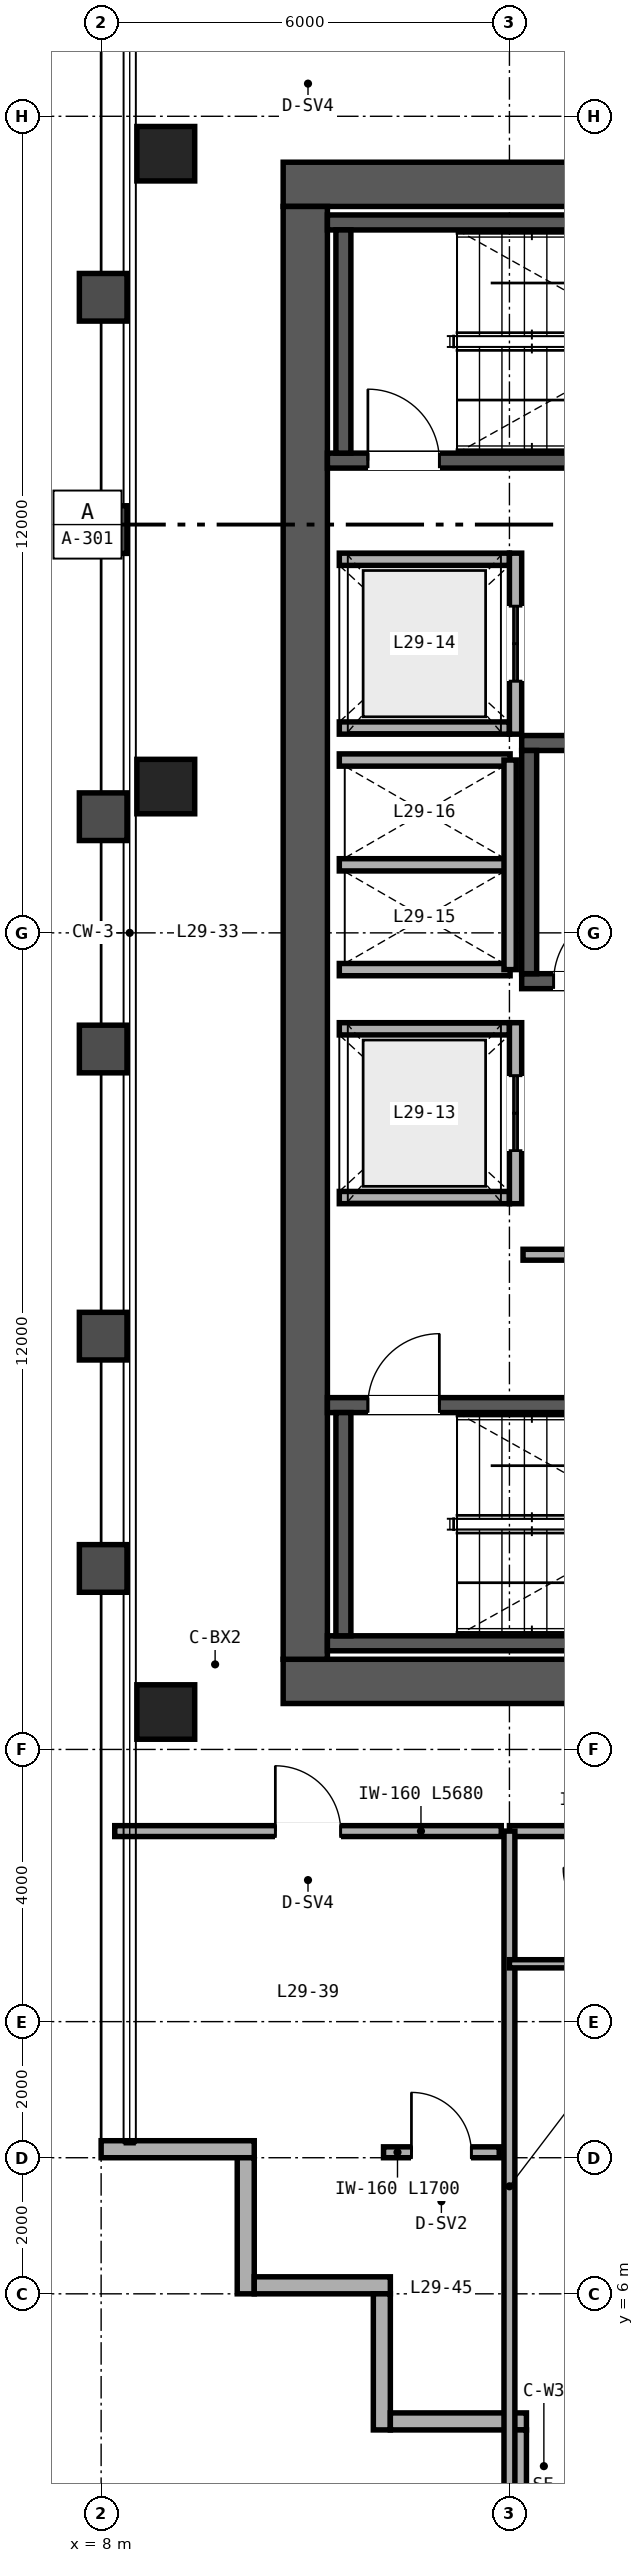
"""IFC4 building model, lengths in metres.
Left out: names, types, materials, properties, quantities, classifications, styles, units other than length and angle.
Written with IfcOpenShell. Run it as: python <this file> out.ifc"""

import sys

from ifc_helpers import new_model, si_unit, direction, frame, frame_2d, origin, origin_2d, place, context, subcontext, project, spatial, rectangle, hollow_rectangle, extrude, source, transform, mapped, element, fill, save


model = new_model("IFC4")
c1 = context("Model", 3, precision=1e-05, world=origin(), true_north=direction((0.0, 1.0)))
c2 = subcontext(c1, "Body", "Model", "MODEL_VIEW")
j1 = project(units=[si_unit("LENGTHUNIT", "METRE"), si_unit("PLANEANGLEUNIT", "RADIAN")], contexts=[c1])
p1 = place(None, origin())
s1 = spatial("IfcSite", under=j1, at=p1, CompositionType="ELEMENT")
p2 = place(p1, origin())
s2 = spatial("IfcBuilding", under=s1, at=p2, CompositionType="ELEMENT")
p3 = place(p2, frame((0.0, 0.0, 118.8)))
s3 = spatial("IfcBuildingStorey", under=s2, at=p3, CompositionType="ELEMENT", Elevation=118.8)
p4 = place(p3, frame((10.675, 15.0, 0.0), z_axis=(0.0, 0.0, 1.0), x_axis=(1.0, 0.0, 0.0)))
e1 = element("IfcWall", 1, at=p4, inside=s3, PredefinedType="SHEAR", context=c2, shape_type="SweptSolid", body=[
    extrude(rectangle(XDim=12.65, YDim=0.65, at=frame_2d((6.325, 0.0))), origin(), (0.0, 0.0, 1.0), 3.36),
])
p5 = place(p4, frame((8.905, 0.0, 0.0)))
e2 = element("IfcOpeningElement", 2, at=p5, cuts=e1, PredefinedType="OPENING", context=c2, shape_type="SweptSolid", body=[
    extrude(rectangle(XDim=1.0, YDim=2.15, at=frame_2d((0.5, 1.075))), frame((0.0, 0.335, 0.0), z_axis=(0.0, -1.0, 0.0), x_axis=(1.0, 0.0, 0.0)), (0.0, 0.0, 1.0), 0.67),
])
p6 = place(p3, frame((10.675, 37.0, 0.0), z_axis=(0.0, 0.0, 1.0), x_axis=(1.0, 0.0, 0.0)))
e3 = element("IfcWall", 3, at=p6, inside=s3, PredefinedType="SHEAR", context=c2, shape_type="SweptSolid", body=[
    extrude(rectangle(XDim=12.65, YDim=0.65, at=frame_2d((6.325, 0.0))), origin(), (0.0, 0.0, 1.0), 3.36),
])
p7 = place(p6, frame((8.905, 0.0, 0.0)))
e4 = element("IfcOpeningElement", 4, at=p7, cuts=e3, PredefinedType="OPENING", context=c2, shape_type="SweptSolid", body=[
    extrude(rectangle(XDim=1.0, YDim=2.15, at=frame_2d((0.5, 1.075))), frame((0.0, 0.335, 0.0), z_axis=(0.0, -1.0, 0.0), x_axis=(1.0, 0.0, 0.0)), (0.0, 0.0, 1.0), 0.67),
])
p8 = place(p3, frame((11.0, 15.325, 0.0), z_axis=(0.0, 0.0, 1.0), x_axis=(0.0, 1.0, 0.0)))
e5 = element("IfcWall", 5, at=p8, inside=s3, PredefinedType="SHEAR", context=c2, shape_type="SweptSolid", body=[
    extrude(rectangle(XDim=21.35, YDim=0.65, at=frame_2d((10.675, 0.0))), origin(), (0.0, 0.0, 1.0), 3.36),
])
p9 = place(p3, frame((11.325, 15.56, 0.0), z_axis=(0.0, 0.0, 1.0), x_axis=(1.0, 0.0, 0.0)))
e6 = element("IfcWall", 6, at=p9, inside=s3, PredefinedType="SHEAR", context=c2, shape_type="SweptSolid", body=[
    extrude(rectangle(XDim=7.985, YDim=0.22, at=frame_2d((3.993, 0.0))), origin(), (0.0, 0.0, 1.0), 3.4),
])
p10 = place(p3, frame((11.325, 19.06, 0.0), z_axis=(0.0, 0.0, 1.0), x_axis=(1.0, 0.0, 0.0)))
e7 = element("IfcWall", 7, at=p10, inside=s3, PredefinedType="SHEAR", context=c2, shape_type="SweptSolid", body=[
    extrude(rectangle(XDim=7.985, YDim=0.22, at=frame_2d((3.993, 0.0))), origin(), (0.0, 0.0, 1.0), 3.4),
])
p11 = place(p10, frame((0.595, 0.0, 0.0)))
e8 = element("IfcOpeningElement", 8, at=p11, cuts=e7, PredefinedType="OPENING", context=c2, shape_type="SweptSolid", body=[
    extrude(rectangle(XDim=1.05, YDim=2.15, at=frame_2d((0.525, 1.075))), frame((0.0, 0.12, 0.0), z_axis=(0.0, -1.0, 0.0), x_axis=(1.0, 0.0, 0.0)), (0.0, 0.0, 1.0), 0.24),
])
p12 = place(p3, frame((11.56, 15.67, 0.0), z_axis=(0.0, 0.0, 1.0), x_axis=(0.0, 1.0, 0.0)))
e9 = element("IfcWall", 9, at=p12, inside=s3, PredefinedType="SHEAR", context=c2, shape_type="SweptSolid", body=[
    extrude(rectangle(XDim=3.28, YDim=0.22, at=frame_2d((1.64, 0.0))), origin(), (0.0, 0.0, 1.0), 3.4),
])
p13 = place(p3, frame((11.325, 32.94, 0.0), z_axis=(0.0, 0.0, 1.0), x_axis=(1.0, 0.0, 0.0)))
e10 = element("IfcWall", 10, at=p13, inside=s3, PredefinedType="SHEAR", context=c2, shape_type="SweptSolid", body=[
    extrude(rectangle(XDim=7.985, YDim=0.22, at=frame_2d((3.993, 0.0))), origin(), (0.0, 0.0, 1.0), 3.4),
])
p14 = place(p13, frame((0.595, 0.0, 0.0)))
e11 = element("IfcOpeningElement", 11, at=p14, cuts=e10, PredefinedType="OPENING", context=c2, shape_type="SweptSolid", body=[
    extrude(rectangle(XDim=1.05, YDim=2.15, at=frame_2d((0.525, 1.075))), frame((0.0, 0.12, 0.0), z_axis=(0.0, -1.0, 0.0), x_axis=(1.0, 0.0, 0.0)), (0.0, 0.0, 1.0), 0.24),
])
p15 = place(p3, frame((11.325, 36.44, 0.0), z_axis=(0.0, 0.0, 1.0), x_axis=(1.0, 0.0, 0.0)))
e12 = element("IfcWall", 12, at=p15, inside=s3, PredefinedType="SHEAR", context=c2, shape_type="SweptSolid", body=[
    extrude(rectangle(XDim=7.985, YDim=0.22, at=frame_2d((3.993, 0.0))), origin(), (0.0, 0.0, 1.0), 3.4),
])
p16 = place(p3, frame((11.56, 33.05, 0.0), z_axis=(0.0, 0.0, 1.0), x_axis=(0.0, 1.0, 0.0)))
e13 = element("IfcWall", 13, at=p16, inside=s3, PredefinedType="SHEAR", context=c2, shape_type="SweptSolid", body=[
    extrude(rectangle(XDim=3.28, YDim=0.22, at=frame_2d((1.64, 0.0))), origin(), (0.0, 0.0, 1.0), 3.4),
])
p17 = place(p3, frame((14.18, 25.29, 0.0), z_axis=(0.0, 0.0, 1.0), x_axis=(1.0, 0.0, 0.0)))
e14 = element("IfcWall", 14, at=p17, inside=s3, PredefinedType="SHEAR", context=c2, shape_type="SweptSolid", body=[
    extrude(rectangle(XDim=8.495, YDim=0.22, at=frame_2d((4.248, 0.0))), origin(), (0.0, 0.0, 1.0), 3.4),
])
p18 = place(p17, frame((0.47, 0.0, 0.0)))
e15 = element("IfcOpeningElement", 15, at=p18, cuts=e14, PredefinedType="OPENING", context=c2, shape_type="SweptSolid", body=[
    extrude(rectangle(XDim=1.05, YDim=2.15, at=frame_2d((0.525, 1.075))), frame((0.0, 0.12, 0.0), z_axis=(0.0, -1.0, 0.0), x_axis=(1.0, 0.0, 0.0)), (0.0, 0.0, 1.0), 0.24),
])
p19 = place(p3, frame((14.18, 28.79, 0.0), z_axis=(0.0, 0.0, 1.0), x_axis=(1.0, 0.0, 0.0)))
e16 = element("IfcWall", 16, at=p19, inside=s3, PredefinedType="SHEAR", context=c2, shape_type="SweptSolid", body=[
    extrude(rectangle(XDim=8.495, YDim=0.22, at=frame_2d((4.248, 0.0))), origin(), (0.0, 0.0, 1.0), 3.4),
])
p20 = place(p3, frame((14.29, 25.4, 0.0), z_axis=(0.0, 0.0, 1.0), x_axis=(0.0, 1.0, 0.0)))
e17 = element("IfcWall", 17, at=p20, inside=s3, PredefinedType="SHEAR", context=c2, shape_type="SweptSolid", body=[
    extrude(rectangle(XDim=3.28, YDim=0.22, at=frame_2d((1.64, 0.0))), origin(), (0.0, 0.0, 1.0), 3.4),
])
m1 = source(origin(), c2, "Body", "SweptSolid", [
    extrude(hollow_rectangle(XDim=0.85, YDim=0.8, WallThickness=0.032, at=origin_2d()), origin(), (0.0, 0.0, 1.0), 3.36),
])
for number, where, z_axis, x_axis in (
    (18, (8.95, 14.55, 0.0), (0.0, 0.0, 1.0), (1.0, 0.0, 0.0)),
    (19, (8.95, 28.15, 0.0), (0.0, 0.0, 1.0), (1.0, 0.0, 0.0)),
    (20, (8.95, 37.45, 0.0), (0.0, 0.0, 1.0), (1.0, 0.0, 0.0)),
):
    element("IfcColumn", number, at=place(p3, frame(where, z_axis=z_axis, x_axis=x_axis)), inside=s3, PredefinedType="COLUMN", context=c2, shape_type="MappedRepresentation", body=[
        mapped(m1, transform((0.0, 0.0, 0.0), scale=1.0)),
    ])
p21 = place(p3, frame((8.0, 8.125, 0.0), z_axis=(0.0, 0.0, 1.0), x_axis=(1.0, 0.0, 0.0)))
e21 = element("IfcWall", 21, at=p21, inside=s3, PredefinedType="SOLIDWALL", context=c2, shape_type="SweptSolid", body=[
    extrude(rectangle(XDim=2.25, YDim=0.25, at=frame_2d((1.125, 0.0))), origin(), (0.0, 0.0, 1.0), 3.36),
])
for number, where, z_axis, x_axis in (
    (22, (10.125, 8.0, 0.0), (0.0, 0.0, 1.0), (0.0, -1.0, 0.0)),
    (23, (10.25, 6.125, 0.0), (0.0, 0.0, 1.0), (1.0, 0.0, 0.0)),
    (24, (12.125, 6.0, 0.0), (0.0, 0.0, 1.0), (0.0, -1.0, 0.0)),
    (25, (12.25, 4.125, 0.0), (0.0, 0.0, 1.0), (1.0, 0.0, 0.0)),
):
    element("IfcWall", number, at=place(p3, frame(where, z_axis=z_axis, x_axis=x_axis)), inside=s3, PredefinedType="SOLIDWALL", context=c2, shape_type="SweptSolid", body=[
        extrude(rectangle(XDim=2.0, YDim=0.25, at=frame_2d((1.0, 0.0))), origin(), (0.0, 0.0, 1.0), 3.36),
    ])
p22 = place(p3, frame((14.125, 4.0, 0.0), z_axis=(0.0, 0.0, 1.0), x_axis=(0.0, -1.0, 0.0)))
e26 = element("IfcWall", 26, at=p22, inside=s3, PredefinedType="SOLIDWALL", context=c2, shape_type="SweptSolid", body=[
    extrude(rectangle(XDim=2.0, YDim=0.25, at=frame_2d((1.0, 0.0))), origin(), (0.0, 0.0, 1.0), 2.667),
])
for number, where, z_axis, x_axis in (
    (27, (11.5, 22.11, 0.0), (0.0, 0.0, 1.0), (1.0, 0.0, 0.0)),
    (28, (11.5, 24.59, 0.0), (0.0, 0.0, 1.0), (1.0, 0.0, 0.0)),
):
    element("IfcWall", number, at=place(p3, frame(where, z_axis=z_axis, x_axis=x_axis)), inside=s3, PredefinedType="SOLIDWALL", context=c2, shape_type="SweptSolid", body=[
        extrude(rectangle(XDim=2.5, YDim=0.18, at=frame_2d((1.25, 0.0))), origin(), (0.0, 0.0, 1.0), 3.36),
    ])
p23 = place(p3, frame((14.09, 22.02, 0.0), z_axis=(0.0, 0.0, 1.0), x_axis=(0.0, 1.0, 0.0)))
e29 = element("IfcWall", 29, at=p23, inside=s3, PredefinedType="SOLIDWALL", context=c2, shape_type="SweptSolid", body=[
    extrude(rectangle(XDim=2.66, YDim=0.18, at=frame_2d((1.33, 0.0))), origin(), (0.0, 0.0, 1.0), 3.36),
])
p24 = place(p23, frame((0.78, 0.0, 0.0)))
e30 = element("IfcOpeningElement", 30, at=p24, cuts=e29, PredefinedType="OPENING", context=c2, shape_type="SweptSolid", body=[
    extrude(rectangle(XDim=1.1, YDim=2.2, at=frame_2d((0.55, 1.1))), frame((0.0, 0.1, 0.0), z_axis=(0.0, -1.0, 0.0), x_axis=(1.0, 0.0, 0.0)), (0.0, 0.0, 1.0), 0.2),
])
for number, where, z_axis, x_axis in (
    (31, (11.5, 29.01, 0.0), (0.0, 0.0, 1.0), (1.0, 0.0, 0.0)),
    (32, (11.5, 31.49, 0.0), (0.0, 0.0, 1.0), (1.0, 0.0, 0.0)),
):
    element("IfcWall", number, at=place(p3, frame(where, z_axis=z_axis, x_axis=x_axis)), inside=s3, PredefinedType="SOLIDWALL", context=c2, shape_type="SweptSolid", body=[
        extrude(rectangle(XDim=2.5, YDim=0.18, at=frame_2d((1.25, 0.0))), origin(), (0.0, 0.0, 1.0), 3.36),
    ])
p25 = place(p3, frame((14.09, 28.92, 0.0), z_axis=(0.0, 0.0, 1.0), x_axis=(0.0, 1.0, 0.0)))
e33 = element("IfcWall", 33, at=p25, inside=s3, PredefinedType="SOLIDWALL", context=c2, shape_type="SweptSolid", body=[
    extrude(rectangle(XDim=2.66, YDim=0.18, at=frame_2d((1.33, 0.0))), origin(), (0.0, 0.0, 1.0), 3.36),
])
p26 = place(p25, frame((0.78, 0.0, 0.0)))
e34 = element("IfcOpeningElement", 34, at=p26, cuts=e33, PredefinedType="OPENING", context=c2, shape_type="SweptSolid", body=[
    extrude(rectangle(XDim=1.1, YDim=2.2, at=frame_2d((0.55, 1.1))), frame((0.0, 0.1, 0.0), z_axis=(0.0, -1.0, 0.0), x_axis=(1.0, 0.0, 0.0)), (0.0, 0.0, 1.0), 0.2),
])
for number, where, z_axis, x_axis in (
    (35, (11.5, 25.46, 0.0), (0.0, 0.0, 1.0), (1.0, 0.0, 0.0)),
    (36, (11.5, 27.0, 0.0), (0.0, 0.0, 1.0), (1.0, 0.0, 0.0)),
    (37, (11.5, 28.54, 0.0), (0.0, 0.0, 1.0), (1.0, 0.0, 0.0)),
):
    element("IfcWall", number, at=place(p3, frame(where, z_axis=z_axis, x_axis=x_axis)), inside=s3, PredefinedType="SOLIDWALL", context=c2, shape_type="SweptSolid", body=[
        extrude(rectangle(XDim=2.51, YDim=0.18, at=frame_2d((1.255, 0.0))), origin(), (0.0, 0.0, 1.0), 3.36),
    ])
p27 = place(p3, frame((14.01, 25.46, 0.0), z_axis=(0.0, 0.0, 1.0), x_axis=(0.0, 1.0, 0.0)))
e38 = element("IfcWall", 38, at=p27, inside=s3, PredefinedType="SOLIDWALL", context=c2, shape_type="SweptSolid", body=[
    extrude(rectangle(XDim=3.08, YDim=0.18, at=frame_2d((1.54, 0.0))), origin(), (0.0, 0.0, 1.0), 3.36),
])
p28 = place(p3, frame((14.2, 21.27, 0.0), z_axis=(0.0, 0.0, 1.0), x_axis=(1.0, 0.0, 0.0)))
e39 = element("IfcWall", 39, at=p28, inside=s3, PredefinedType="PARTITIONING", context=c2, shape_type="SweptSolid", body=[
    extrude(rectangle(XDim=4.58, YDim=0.16, at=frame_2d((2.29, 0.0))), origin(), (0.0, 0.0, 1.0), 3.36),
])
p29 = place(p28, frame((1.8, 0.0, 0.0)))
e40 = element("IfcOpeningElement", 40, at=p29, cuts=e39, PredefinedType="OPENING", context=c2, shape_type="SweptSolid", body=[
    extrude(rectangle(XDim=1.0, YDim=2.15, at=frame_2d((0.5, 1.075))), frame((0.0, 0.09, 0.0), z_axis=(0.0, -1.0, 0.0), x_axis=(1.0, 0.0, 0.0)), (0.0, 0.0, 1.0), 0.18),
])
p30 = place(p3, frame((8.2, 12.8, 0.0), z_axis=(0.0, 0.0, 1.0), x_axis=(1.0, 0.0, 0.0)))
e41 = element("IfcWall", 41, at=p30, inside=s3, PredefinedType="PARTITIONING", context=c2, shape_type="SweptSolid", body=[
    extrude(rectangle(XDim=5.68, YDim=0.16, at=frame_2d((2.84, 0.0))), origin(), (0.0, 0.0, 1.0), 3.36),
])
p31 = place(p30, frame((2.36, 0.0, 0.0)))
e42 = element("IfcOpeningElement", 42, at=p31, cuts=e41, PredefinedType="OPENING", context=c2, shape_type="SweptSolid", body=[
    extrude(rectangle(XDim=0.96, YDim=2.15, at=frame_2d((0.48, 1.075))), frame((0.0, 0.09, 0.0), z_axis=(0.0, -1.0, 0.0), x_axis=(1.0, 0.0, 0.0)), (0.0, 0.0, 1.0), 0.18),
])
p32 = place(p3, frame((12.15, 8.08, 0.0), z_axis=(0.0, 0.0, 1.0), x_axis=(1.0, 0.0, 0.0)))
e43 = element("IfcWall", 43, at=p32, inside=s3, PredefinedType="PARTITIONING", context=c2, shape_type="SweptSolid", body=[
    extrude(rectangle(XDim=1.7, YDim=0.16, at=frame_2d((0.85, 0.0))), origin(), (0.0, 0.0, 1.0), 3.36),
])
p33 = place(p32, frame((0.41, 0.0, 0.0)))
e44 = element("IfcOpeningElement", 44, at=p33, cuts=e43, PredefinedType="OPENING", context=c2, shape_type="SweptSolid", body=[
    extrude(rectangle(XDim=0.88, YDim=2.15, at=frame_2d((0.44, 1.075))), frame((0.0, 0.09, 0.0), z_axis=(0.0, -1.0, 0.0), x_axis=(1.0, 0.0, 0.0)), (0.0, 0.0, 1.0), 0.18),
])
p34 = place(p3, frame((14.0, 12.8, 0.0), z_axis=(0.0, 0.0, 1.0), x_axis=(1.0, 0.0, 0.0)))
e45 = element("IfcWall", 45, at=p34, inside=s3, PredefinedType="PARTITIONING", context=c2, shape_type="SweptSolid", body=[
    extrude(rectangle(XDim=36.0, YDim=0.16, at=frame_2d((18.0, 0.0))), origin(), (0.0, 0.0, 1.0), 2.581),
])
p35 = place(p34, frame((4.14, 0.0, 0.0)))
e46 = element("IfcOpeningElement", 46, at=p35, cuts=e45, PredefinedType="OPENING", context=c2, shape_type="SweptSolid", body=[
    extrude(rectangle(XDim=0.94, YDim=2.15, at=frame_2d((0.47, 1.075))), frame((0.0, 0.09, 0.0), z_axis=(0.0, -1.0, 0.0), x_axis=(1.0, 0.0, 0.0)), (0.0, 0.0, 1.0), 0.18),
])
p36 = place(p34, frame((9.54, 0.0, 0.0)))
e47 = element("IfcOpeningElement", 47, at=p36, cuts=e45, PredefinedType="OPENING", context=c2, shape_type="SweptSolid", body=[
    extrude(rectangle(XDim=0.94, YDim=2.15, at=frame_2d((0.47, 1.075))), frame((0.0, 0.09, 0.0), z_axis=(0.0, -1.0, 0.0), x_axis=(1.0, 0.0, 0.0)), (0.0, 0.0, 1.0), 0.18),
])
p37 = place(p34, frame((13.22, 0.0, 0.0)))
e48 = element("IfcOpeningElement", 48, at=p37, cuts=e45, PredefinedType="OPENING", context=c2, shape_type="SweptSolid", body=[
    extrude(rectangle(XDim=0.96, YDim=2.15, at=frame_2d((0.48, 1.075))), frame((0.0, 0.09, 0.0), z_axis=(0.0, -1.0, 0.0), x_axis=(1.0, 0.0, 0.0)), (0.0, 0.0, 1.0), 0.18),
])
p38 = place(p34, frame((19.02, 0.0, 0.0)))
e49 = element("IfcOpeningElement", 49, at=p38, cuts=e45, PredefinedType="OPENING", context=c2, shape_type="SweptSolid", body=[
    extrude(rectangle(XDim=0.96, YDim=2.15, at=frame_2d((0.48, 1.075))), frame((0.0, 0.09, 0.0), z_axis=(0.0, -1.0, 0.0), x_axis=(1.0, 0.0, 0.0)), (0.0, 0.0, 1.0), 0.18),
])
p39 = place(p34, frame((24.62, 0.0, 0.0)))
e50 = element("IfcOpeningElement", 50, at=p39, cuts=e45, PredefinedType="OPENING", context=c2, shape_type="SweptSolid", body=[
    extrude(rectangle(XDim=0.96, YDim=2.15, at=frame_2d((0.48, 1.075))), frame((0.0, 0.09, 0.0), z_axis=(0.0, -1.0, 0.0), x_axis=(1.0, 0.0, 0.0)), (0.0, 0.0, 1.0), 0.18),
])
p40 = place(p34, frame((30.74, 0.0, 0.0)))
e51 = element("IfcOpeningElement", 51, at=p40, cuts=e45, PredefinedType="OPENING", context=c2, shape_type="SweptSolid", body=[
    extrude(rectangle(XDim=0.94, YDim=2.15, at=frame_2d((0.47, 1.075))), frame((0.0, 0.09, 0.0), z_axis=(0.0, -1.0, 0.0), x_axis=(1.0, 0.0, 0.0)), (0.0, 0.0, 1.0), 0.18),
])
p41 = place(p34, frame((33.52, 0.0, 0.0)))
e52 = element("IfcOpeningElement", 52, at=p41, cuts=e45, PredefinedType="OPENING", context=c2, shape_type="SweptSolid", body=[
    extrude(rectangle(XDim=0.96, YDim=2.15, at=frame_2d((0.48, 1.075))), frame((0.0, 0.09, 0.0), z_axis=(0.0, -1.0, 0.0), x_axis=(1.0, 0.0, 0.0)), (0.0, 0.0, 1.0), 0.18),
])
p42 = place(p3, frame((14.0, 2.36, 0.0), z_axis=(0.0, 0.0, 1.0), x_axis=(0.0, 1.0, 0.0)))
e53 = element("IfcWall", 53, at=p42, inside=s3, PredefinedType="PARTITIONING", context=c2, shape_type="SweptSolid", body=[
    extrude(rectangle(XDim=10.44, YDim=0.16, at=frame_2d((5.22, 0.0))), origin(), (0.0, 0.0, 1.0), 2.667),
])
p43 = place(p3, frame((14.0, 10.85, 0.0), z_axis=(0.0, 0.0, 1.0), x_axis=(1.0, 0.0, 0.0)))
e54 = element("IfcWall", 54, at=p43, inside=s3, PredefinedType="PARTITIONING", context=c2, shape_type="SweptSolid", body=[
    extrude(rectangle(XDim=1.65, YDim=0.12, at=frame_2d((0.825, 0.0))), origin(), (0.0, 0.0, 1.0), 3.36),
])
m2 = source(origin(), c2, "Body", "SweptSolid", [
    extrude(rectangle(XDim=1.05, YDim=2.15, at=frame_2d((0.525, 1.075))), frame((0.0, 0.025, 0.0), z_axis=(0.0, -1.0, 0.0), x_axis=(1.0, 0.0, 0.0)), (0.0, 0.0, 1.0), 0.05),
])
p44 = place(p11, origin())
e55 = element("IfcDoor", 55, at=p44, inside=s3, OperationType="SINGLE_SWING_RIGHT", PredefinedType="DOOR", context=c2, shape_type="MappedRepresentation", body=[
    mapped(m2, transform((0.0, 0.0, 0.0), scale=1.0)),
])
fill(e8, e55)
p45 = place(p14, origin())
e56 = element("IfcDoor", 56, at=p45, inside=s3, OperationType="SINGLE_SWING_LEFT", PredefinedType="DOOR", context=c2, shape_type="MappedRepresentation", body=[
    mapped(m2, transform((0.0, 0.0, 0.0), scale=1.0)),
])
fill(e11, e56)
p46 = place(p18, origin())
e57 = element("IfcDoor", 57, at=p46, inside=s3, OperationType="SINGLE_SWING_RIGHT", PredefinedType="DOOR", context=c2, shape_type="MappedRepresentation", body=[
    mapped(m2, transform((0.0, 0.0, 0.0), scale=1.0)),
])
fill(e15, e57)
m3 = source(origin(), c2, "Body", "SweptSolid", [
    extrude(rectangle(XDim=1.1, YDim=2.2, at=frame_2d((0.55, 1.1))), frame((0.0, 0.025, 0.0), z_axis=(0.0, -1.0, 0.0), x_axis=(1.0, 0.0, 0.0)), (0.0, 0.0, 1.0), 0.05),
])
p47 = place(p24, origin())
e58 = element("IfcDoor", 58, at=p47, inside=s3, OperationType="DOUBLE_DOOR_SLIDING", PredefinedType="DOOR", context=c2, shape_type="MappedRepresentation", body=[
    mapped(m3, transform((0.0, 0.0, 0.0), scale=1.0)),
])
fill(e30, e58)
p48 = place(p26, origin())
e59 = element("IfcDoor", 59, at=p48, inside=s3, OperationType="DOUBLE_DOOR_SLIDING", PredefinedType="DOOR", context=c2, shape_type="MappedRepresentation", body=[
    mapped(m3, transform((0.0, 0.0, 0.0), scale=1.0)),
])
fill(e34, e59)
m4 = source(origin(), c2, "Body", "SweptSolid", [
    extrude(rectangle(XDim=0.96, YDim=2.15, at=frame_2d((0.48, 1.075))), frame((0.0, 0.025, 0.0), z_axis=(0.0, -1.0, 0.0), x_axis=(1.0, 0.0, 0.0)), (0.0, 0.0, 1.0), 0.05),
])
p49 = place(p31, origin())
e60 = element("IfcDoor", 60, at=p49, inside=s3, OperationType="SINGLE_SWING_LEFT", PredefinedType="DOOR", context=c2, shape_type="MappedRepresentation", body=[
    mapped(m4, transform((0.0, 0.0, 0.0), scale=1.0)),
])
fill(e42, e60)
m5 = source(origin(), c2, "Body", "SweptSolid", [
    extrude(rectangle(XDim=0.88, YDim=2.15, at=frame_2d((0.44, 1.075))), frame((0.0, 0.025, 0.0), z_axis=(0.0, -1.0, 0.0), x_axis=(1.0, 0.0, 0.0)), (0.0, 0.0, 1.0), 0.05),
])
p50 = place(p33, origin())
e61 = element("IfcDoor", 61, at=p50, inside=s3, OperationType="SINGLE_SWING_LEFT", PredefinedType="DOOR", context=c2, shape_type="MappedRepresentation", body=[
    mapped(m5, transform((0.0, 0.0, 0.0), scale=1.0)),
])
fill(e44, e61)
save(model, sys.argv[1])
